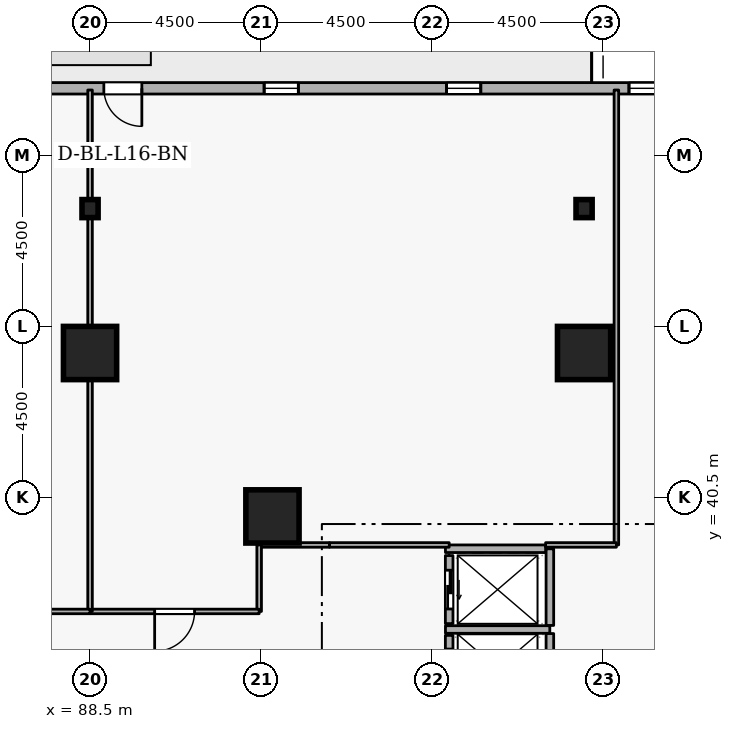
"""IFC4 building model, lengths in metres.
Left out: names, types, materials, properties, quantities, classifications, styles, units other than length and angle.
Written with IfcOpenShell. Run it as: python <this file> out.ifc"""

import sys

from ifc_helpers import new_model, si_unit, direction, frame, frame_2d, origin, origin_2d, place, context, subcontext, project, spatial, rectangle, i_section, extrude, element, fill, save


model = new_model("IFC4")
c1 = context("Model", 3, precision=1e-05, world=origin(), true_north=direction((0.0, 1.0)))
c2 = subcontext(c1, "Body", "Model", "MODEL_VIEW")
j1 = project(units=[si_unit("LENGTHUNIT", "METRE"), si_unit("PLANEANGLEUNIT", "RADIAN")], contexts=[c1])
p1 = place(None, origin())
s1 = spatial("IfcSite", under=j1, at=p1, CompositionType="ELEMENT")
p2 = place(p1, origin())
s2 = spatial("IfcBuilding", under=s1, at=p2, CompositionType="ELEMENT")
p3 = place(p2, frame((0.0, 0.0, 64.5)))
s3 = spatial("IfcBuildingStorey", under=s2, at=p3, CompositionType="ELEMENT", Elevation=64.5)
for number, where, z_axis, x_axis in (
    (1, (101.5, 44.3, 0.0), (0.0, 0.0, 1.0), (1.0, 0.0, 0.0)),
    (2, (88.5, 44.3, 0.0), (0.0, 0.0, 1.0), (1.0, 0.0, 0.0)),
    (3, (93.3, 40.0, 0.0), (0.0, 0.0, 1.0), (1.0, 0.0, 0.0)),
):
    element("IfcColumn", number, at=place(p3, frame(where, z_axis=z_axis, x_axis=x_axis)), inside=s3, PredefinedType="COLUMN", context=c2, shape_type="SweptSolid", body=[
        extrude(rectangle(XDim=1.4, YDim=1.4, at=origin_2d()), origin(), (0.0, 0.0, 1.0), 3.6),
    ])
for number, where, z_axis, x_axis in (
    (4, (101.5, 48.1, 0.0), (0.0, 0.0, 1.0), (1.0, 0.0, 0.0)),
    (5, (88.5, 48.1, 0.0), (0.0, 0.0, 1.0), (1.0, 0.0, 0.0)),
):
    element("IfcColumn", number, at=place(p3, frame(where, z_axis=z_axis, x_axis=x_axis)), inside=s3, PredefinedType="COLUMN", context=c2, shape_type="SweptSolid", body=[
        extrude(i_section(OverallWidth=0.424, OverallDepth=0.475, WebThickness=0.048, FlangeThickness=0.077, FilletRadius=0.015, at=origin_2d()), origin(), (0.0, 0.0, 1.0), 3.6),
    ])
p4 = place(p3, frame((110.181, 51.265, 0.0), z_axis=(0.0, 0.0, 1.0), x_axis=(-0.999999999457, -3.2959355e-05, 0.0)))
e6 = element("IfcWall", 6, at=p4, inside=s3, PredefinedType="STANDARD", context=c2, shape_type="SweptSolid", body=[
    extrude(rectangle(XDim=37.037, YDim=0.3, at=frame_2d((18.518, 0.0))), origin(), (0.0, 0.0, 1.0), 2.7),
])
p5 = place(p4, frame((20.318, 0.0, 0.0)))
e7 = element("IfcOpeningElement", 7, at=p5, cuts=e6, PredefinedType="OPENING", context=c2, shape_type="SweptSolid", body=[
    extrude(rectangle(XDim=1.0, YDim=2.08, at=frame_2d((0.5, 1.04))), frame((0.0, 0.16, 0.0), z_axis=(0.0, -1.0, 0.0), x_axis=(1.0, 0.0, 0.0)), (0.0, 0.0, 1.0), 0.32),
])
p6 = place(p4, frame((1.8, 0.0, 0.72)))
e8 = element("IfcOpeningElement", 8, at=p6, cuts=e6, PredefinedType="OPENING", context=c2, shape_type="SweptSolid", body=[
    extrude(rectangle(XDim=0.9, YDim=1.75, at=frame_2d((0.45, 0.875))), frame((0.0, 0.16, 0.0), z_axis=(0.0, -1.0, 0.0), x_axis=(1.0, 0.0, 0.0)), (0.0, 0.0, 1.0), 0.32),
])
p7 = place(p4, frame((6.6, 0.0, 0.72)))
e9 = element("IfcOpeningElement", 9, at=p7, cuts=e6, PredefinedType="OPENING", context=c2, shape_type="SweptSolid", body=[
    extrude(rectangle(XDim=0.9, YDim=1.75, at=frame_2d((0.45, 0.875))), frame((0.0, 0.16, 0.0), z_axis=(0.0, -1.0, 0.0), x_axis=(1.0, 0.0, 0.0)), (0.0, 0.0, 1.0), 0.32),
])
p8 = place(p4, frame((11.4, 0.0, 0.72)))
e10 = element("IfcOpeningElement", 10, at=p8, cuts=e6, PredefinedType="OPENING", context=c2, shape_type="SweptSolid", body=[
    extrude(rectangle(XDim=0.9, YDim=1.75, at=frame_2d((0.45, 0.875))), frame((0.0, 0.16, 0.0), z_axis=(0.0, -1.0, 0.0), x_axis=(1.0, 0.0, 0.0)), (0.0, 0.0, 1.0), 0.32),
])
p9 = place(p4, frame((16.2, 0.0, 0.72)))
e11 = element("IfcOpeningElement", 11, at=p9, cuts=e6, PredefinedType="OPENING", context=c2, shape_type="SweptSolid", body=[
    extrude(rectangle(XDim=0.9, YDim=1.75, at=frame_2d((0.45, 0.875))), frame((0.0, 0.16, 0.0), z_axis=(0.0, -1.0, 0.0), x_axis=(1.0, 0.0, 0.0)), (0.0, 0.0, 1.0), 0.32),
])
p10 = place(p4, frame((25.8, 0.0, 0.72)))
e12 = element("IfcOpeningElement", 12, at=p10, cuts=e6, PredefinedType="OPENING", context=c2, shape_type="SweptSolid", body=[
    extrude(rectangle(XDim=0.9, YDim=1.75, at=frame_2d((0.45, 0.875))), frame((0.0, 0.16, 0.0), z_axis=(0.0, -1.0, 0.0), x_axis=(1.0, 0.0, 0.0)), (0.0, 0.0, 1.0), 0.32),
])
p11 = place(p4, frame((30.6, 0.0, 0.72)))
e13 = element("IfcOpeningElement", 13, at=p11, cuts=e6, PredefinedType="OPENING", context=c2, shape_type="SweptSolid", body=[
    extrude(rectangle(XDim=0.9, YDim=1.75, at=frame_2d((0.45, 0.875))), frame((0.0, 0.16, 0.0), z_axis=(0.0, -1.0, 0.0), x_axis=(1.0, 0.0, 0.0)), (0.0, 0.0, 1.0), 0.32),
])
p12 = place(p3, frame((97.95, 36.87, 0.0), z_axis=(0.0, 0.0, 1.0), x_axis=(0.0, -1.0, 0.0)))
e14 = element("IfcWall", 14, at=p12, inside=s3, PredefinedType="STANDARD", context=c2, shape_type="SweptSolid", body=[
    extrude(rectangle(XDim=1.74, YDim=0.2, at=frame_2d((0.87, 0.0))), origin(), (0.0, 0.0, 1.0), 3.34),
])
p13 = place(p12, frame((0.36, 0.0, 0.0)))
e15 = element("IfcOpeningElement", 15, at=p13, cuts=e14, PredefinedType="OPENING", context=c2, shape_type="SweptSolid", body=[
    extrude(rectangle(XDim=1.02, YDim=2.06, at=frame_2d((0.51, 1.03))), frame((0.0, 0.11, 0.0), z_axis=(0.0, -1.0, 0.0), x_axis=(1.0, 0.0, 0.0)), (0.0, 0.0, 1.0), 0.22),
])
p14 = place(p3, frame((97.95, 38.97, 0.0), z_axis=(0.0, 0.0, 1.0), x_axis=(0.0, -1.0, 0.0)))
e16 = element("IfcWall", 16, at=p14, inside=s3, PredefinedType="STANDARD", context=c2, shape_type="SweptSolid", body=[
    extrude(rectangle(XDim=1.79, YDim=0.2, at=frame_2d((0.895, 0.0))), origin(), (0.0, 0.0, 1.0), 3.34),
])
p15 = place(p14, frame((0.385, 0.0, 0.0)))
e17 = element("IfcOpeningElement", 17, at=p15, cuts=e16, PredefinedType="OPENING", context=c2, shape_type="SweptSolid", body=[
    extrude(rectangle(XDim=1.02, YDim=2.06, at=frame_2d((0.51, 1.03))), frame((0.0, 0.11, 0.0), z_axis=(0.0, -1.0, 0.0), x_axis=(1.0, 0.0, 0.0)), (0.0, 0.0, 1.0), 0.22),
])
p16 = place(p3, frame((97.852, 37.025, 0.0), z_axis=(0.0, 0.0, 1.0), x_axis=(1.0, 0.0, 0.0)))
e18 = element("IfcWall", 18, at=p16, inside=s3, PredefinedType="STANDARD", context=c2, shape_type="SweptSolid", body=[
    extrude(rectangle(XDim=2.746, YDim=0.2, at=frame_2d((1.373, 0.0))), origin(), (0.0, 0.0, 1.0), 3.34),
])
p17 = place(p3, frame((100.6, 35.062, 0.0), z_axis=(0.0, 0.0, 1.0), x_axis=(0.0, 1.0, 0.0)))
e19 = element("IfcWall", 19, at=p17, inside=s3, PredefinedType="STANDARD", context=c2, shape_type="SweptSolid", body=[
    extrude(rectangle(XDim=1.856, YDim=0.2, at=frame_2d((0.928, 0.0))), origin(), (0.0, 0.0, 1.0), 3.34),
])
p18 = place(p3, frame((100.6, 37.132, 0.0), z_axis=(0.0, 0.0, 1.0), x_axis=(0.0, 1.0, 0.0)))
e20 = element("IfcWall", 20, at=p18, inside=s3, PredefinedType="STANDARD", context=c2, shape_type="SweptSolid", body=[
    extrude(rectangle(XDim=2.016, YDim=0.2, at=frame_2d((1.008, 0.0))), origin(), (0.0, 0.0, 1.0), 3.34),
])
p19 = place(p3, frame((97.852, 39.15, 0.0), z_axis=(0.0, 0.0, 1.0), x_axis=(1.0, 0.0, 0.0)))
e21 = element("IfcWall", 21, at=p19, inside=s3, PredefinedType="STANDARD", context=c2, shape_type="SweptSolid", body=[
    extrude(rectangle(XDim=2.636, YDim=0.2, at=frame_2d((1.318, 0.0))), origin(), (0.0, 0.0, 1.0), 3.34),
])
p20 = place(p3, frame((97.95, 39.25, 0.0), z_axis=(0.0, 0.0, 1.0), x_axis=(-1.0, 0.0, 0.0)))
e22 = element("IfcWall", 22, at=p20, inside=s3, PredefinedType="PARTITIONING", context=c2, shape_type="SweptSolid", body=[
    extrude(rectangle(XDim=3.15, YDim=0.12, at=frame_2d((1.575, 0.0))), origin(), (0.0, 0.0, 1.0), 3.34),
])
p21 = place(p3, frame((94.8, 39.25, 0.0), z_axis=(0.0, 0.0, 1.0), x_axis=(-1.0, 0.0, 0.0)))
e23 = element("IfcWall", 23, at=p21, inside=s3, PredefinedType="PARTITIONING", context=c2, shape_type="SweptSolid", body=[
    extrude(rectangle(XDim=1.85, YDim=0.12, at=frame_2d((0.925, 0.0))), origin(), (0.0, 0.0, 1.0), 3.34),
])
p22 = place(p3, frame((92.95, 39.25, 0.0), z_axis=(0.0, 0.0, 1.0), x_axis=(0.0, -1.0, 0.0)))
e24 = element("IfcWall", 24, at=p22, inside=s3, PredefinedType="PARTITIONING", context=c2, shape_type="SweptSolid", body=[
    extrude(rectangle(XDim=1.75, YDim=0.12, at=frame_2d((0.875, 0.0))), origin(), (0.0, 0.0, 1.0), 3.34),
])
p23 = place(p3, frame((92.95, 37.5, 0.0), z_axis=(0.0, 0.0, 1.0), x_axis=(-1.0, 0.0, 0.0)))
e25 = element("IfcWall", 25, at=p23, inside=s3, PredefinedType="PARTITIONING", context=c2, shape_type="SweptSolid", body=[
    extrude(rectangle(XDim=4.45, YDim=0.12, at=frame_2d((2.225, 0.0))), origin(), (0.0, 0.0, 1.0), 3.34),
])
p24 = place(p23, frame((1.7, 0.0, 0.0)))
e26 = element("IfcOpeningElement", 26, at=p24, cuts=e25, PredefinedType="OPENING", context=c2, shape_type="SweptSolid", body=[
    extrude(rectangle(XDim=1.05, YDim=2.1, at=frame_2d((0.525, 1.05))), frame((0.0, 0.07, 0.0), z_axis=(0.0, -1.0, 0.0), x_axis=(1.0, 0.0, 0.0)), (0.0, 0.0, 1.0), 0.14),
])
p25 = place(p3, frame((88.5, 37.5, 0.0), z_axis=(0.0, 0.0, 1.0), x_axis=(0.0, 1.0, 0.0)))
e27 = element("IfcWall", 27, at=p25, inside=s3, PredefinedType="PARTITIONING", context=c2, shape_type="SweptSolid", body=[
    extrude(rectangle(XDim=13.72, YDim=0.12, at=frame_2d((6.86, 0.0))), origin(), (0.0, 0.0, 1.0), 2.878),
])
p26 = place(p3, frame((102.35, 51.22, 0.0), z_axis=(0.0, 0.0, 1.0), x_axis=(0.0, -1.0, 0.0)))
e28 = element("IfcWall", 28, at=p26, inside=s3, PredefinedType="PARTITIONING", context=c2, shape_type="SweptSolid", body=[
    extrude(rectangle(XDim=11.97, YDim=0.12, at=frame_2d((5.985, 0.0))), origin(), (0.0, 0.0, 1.0), 3.34),
])
p27 = place(p3, frame((102.35, 39.25, 0.0), z_axis=(0.0, 0.0, 1.0), x_axis=(-1.0, 0.0, 0.0)))
e29 = element("IfcWall", 29, at=p27, inside=s3, PredefinedType="PARTITIONING", context=c2, shape_type="SweptSolid", body=[
    extrude(rectangle(XDim=1.862, YDim=0.12, at=frame_2d((0.931, 0.0))), origin(), (0.0, 0.0, 1.0), 3.34),
])
p28 = place(p3, frame((88.5, 37.5, 0.0), z_axis=(0.0, 0.0, 1.0), x_axis=(-1.0, 0.0, 0.0)))
e30 = element("IfcWall", 30, at=p28, inside=s3, PredefinedType="PARTITIONING", context=c2, shape_type="SweptSolid", body=[
    extrude(rectangle(XDim=3.15, YDim=0.12, at=frame_2d((1.575, 0.0))), origin(), (0.0, 0.0, 1.0), 3.34),
])
p29 = place(p28, frame((1.1, 0.0, 0.0)))
e31 = element("IfcOpeningElement", 31, at=p29, cuts=e30, PredefinedType="OPENING", context=c2, shape_type="SweptSolid", body=[
    extrude(rectangle(XDim=0.95, YDim=2.1, at=frame_2d((0.475, 1.05))), frame((0.0, 0.07, 0.0), z_axis=(0.0, -1.0, 0.0), x_axis=(1.0, 0.0, 0.0)), (0.0, 0.0, 1.0), 0.14),
])
p30 = place(p5, origin())
e32 = element("IfcDoor", 32, at=p30, inside=s3, OperationType="SINGLE_SWING_LEFT", PredefinedType="DOOR", context=c2, shape_type="SweptSolid", body=[
    extrude(rectangle(XDim=1.0, YDim=2.08, at=frame_2d((0.5, 1.04))), frame((0.0, 0.025, 0.0), z_axis=(0.0, -1.0, 0.0), x_axis=(1.0, 0.0, 0.0)), (0.0, 0.0, 1.0), 0.05),
])
fill(e7, e32)
p31 = place(p7, origin())
e33 = element("IfcWindow", 33, at=p31, inside=s3, PartitioningType="SINGLE_PANEL", PredefinedType="WINDOW", context=c2, shape_type="SweptSolid", body=[
    extrude(rectangle(XDim=0.9, YDim=1.75, at=frame_2d((0.45, 0.875))), frame((0.0, 0.03, 0.0), z_axis=(0.0, -1.0, 0.0), x_axis=(1.0, 0.0, 0.0)), (0.0, 0.0, 1.0), 0.06),
])
fill(e9, e33)
p32 = place(p8, origin())
e34 = element("IfcWindow", 34, at=p32, inside=s3, PartitioningType="SINGLE_PANEL", PredefinedType="WINDOW", context=c2, shape_type="SweptSolid", body=[
    extrude(rectangle(XDim=0.9, YDim=1.75, at=frame_2d((0.45, 0.875))), frame((0.0, 0.03, 0.0), z_axis=(0.0, -1.0, 0.0), x_axis=(1.0, 0.0, 0.0)), (0.0, 0.0, 1.0), 0.06),
])
fill(e10, e34)
p33 = place(p9, origin())
e35 = element("IfcWindow", 35, at=p33, inside=s3, PartitioningType="SINGLE_PANEL", PredefinedType="WINDOW", context=c2, shape_type="SweptSolid", body=[
    extrude(rectangle(XDim=0.9, YDim=1.75, at=frame_2d((0.45, 0.875))), frame((0.0, 0.03, 0.0), z_axis=(0.0, -1.0, 0.0), x_axis=(1.0, 0.0, 0.0)), (0.0, 0.0, 1.0), 0.06),
])
fill(e11, e35)
p34 = place(p13, origin())
e36 = element("IfcDoor", 36, at=p34, inside=s3, OperationType="SLIDING_TO_LEFT", PredefinedType="DOOR", context=c2, shape_type="SweptSolid", body=[
    extrude(rectangle(XDim=1.02, YDim=2.06, at=frame_2d((0.51, 1.03))), frame((0.0, 0.025, 0.0), z_axis=(0.0, -1.0, 0.0), x_axis=(1.0, 0.0, 0.0)), (0.0, 0.0, 1.0), 0.05),
])
fill(e15, e36)
p35 = place(p15, origin())
e37 = element("IfcDoor", 37, at=p35, inside=s3, OperationType="SLIDING_TO_LEFT", PredefinedType="DOOR", context=c2, shape_type="SweptSolid", body=[
    extrude(rectangle(XDim=1.02, YDim=2.06, at=frame_2d((0.51, 1.03))), frame((0.0, 0.025, 0.0), z_axis=(0.0, -1.0, 0.0), x_axis=(1.0, 0.0, 0.0)), (0.0, 0.0, 1.0), 0.05),
])
fill(e17, e37)
p36 = place(p24, origin())
e38 = element("IfcDoor", 38, at=p36, inside=s3, OperationType="SINGLE_SWING_RIGHT", PredefinedType="DOOR", context=c2, shape_type="SweptSolid", body=[
    extrude(rectangle(XDim=1.05, YDim=2.1, at=frame_2d((0.525, 1.05))), frame((0.0, 0.025, 0.0), z_axis=(0.0, -1.0, 0.0), x_axis=(1.0, 0.0, 0.0)), (0.0, 0.0, 1.0), 0.05),
])
fill(e26, e38)
save(model, sys.argv[1])
